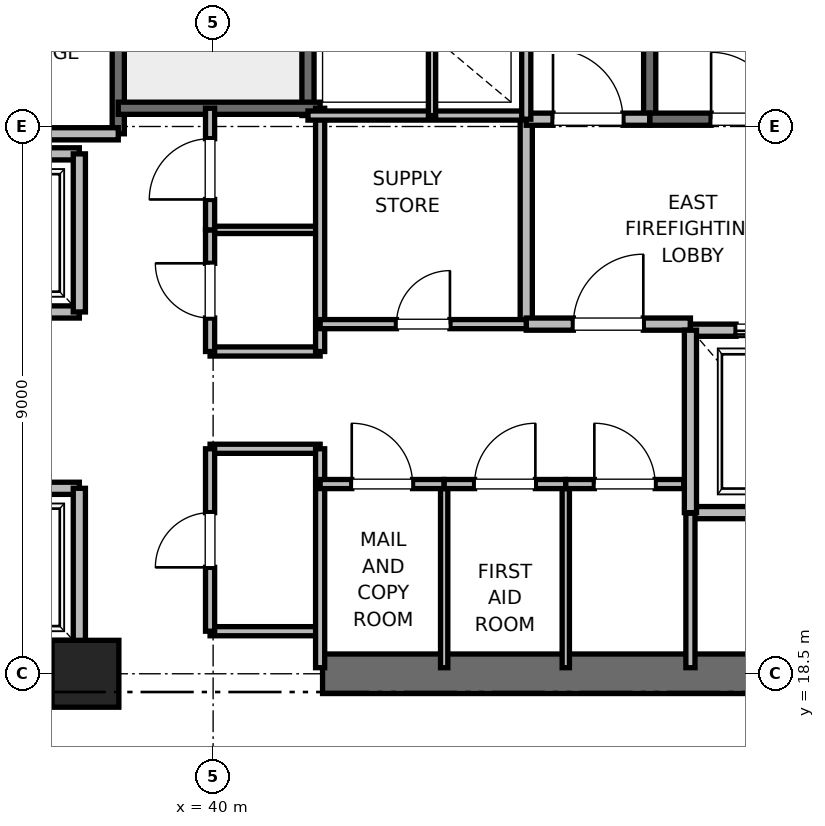
"""IFC4 building model, lengths in metres.
Left out: names, types, materials, properties, quantities, classifications, styles, units other than length and angle.
Written with IfcOpenShell. Run it as: python <this file> out.ifc"""

import sys

from ifc_helpers import new_model, si_unit, direction, frame, frame_2d, origin, origin_2d, place, context, subcontext, project, spatial, rectangle, extrude, element, fill, save


model = new_model("IFC4")
c1 = context("Model", 3, precision=1e-05, world=origin(), true_north=direction((0.0, 1.0)))
c2 = subcontext(c1, "Body", "Model", "MODEL_VIEW")
j1 = project(units=[si_unit("LENGTHUNIT", "METRE"), si_unit("PLANEANGLEUNIT", "RADIAN")], contexts=[c1])
p1 = place(None, origin())
s1 = spatial("IfcSite", under=j1, at=p1, CompositionType="ELEMENT")
p2 = place(p1, origin())
s2 = spatial("IfcBuilding", under=s1, at=p2, CompositionType="ELEMENT")
p3 = place(p2, frame((0.0, 0.0, 63.6)))
s3 = spatial("IfcBuildingStorey", under=s2, at=p3, CompositionType="ELEMENT", Elevation=63.6)
p4 = place(p3, frame((37.9, 18.5, 0.0), z_axis=(0.0, 0.0, 1.0), x_axis=(1.0, 0.0, 0.0)))
e1 = element("IfcColumn", 1, at=p4, inside=s3, PredefinedType="PILASTER", context=c2, shape_type="SweptSolid", body=[
    extrude(rectangle(XDim=1.1, YDim=1.1, at=origin_2d()), origin(), (0.0, 0.0, 1.0), 4.0),
])
for number, where, z_axis, x_axis in (
    (2, (29.0, 18.5, 0.0), (0.0, 0.0, 1.0), (1.0, 0.0, 0.0)),
    (3, (41.8, 18.5, 0.0), (0.0, 0.0, 1.0), (1.0, 0.0, 0.0)),
):
    element("IfcWall", number, at=place(p3, frame(where, z_axis=z_axis, x_axis=x_axis)), inside=s3, PredefinedType="SHEAR", context=c2, shape_type="SweptSolid", body=[
        extrude(rectangle(XDim=9.2, YDim=0.65, at=frame_2d((4.6, 0.0))), origin(), (0.0, 0.0, 1.0), 3.76),
    ])
p5 = place(p3, frame((47.18, 27.62, 0.0), z_axis=(0.0, 0.0, 1.0), x_axis=(0.0, 1.0, 0.0)))
e4 = element("IfcWall", 4, at=p5, inside=s3, PredefinedType="SOLIDWALL", context=c2, shape_type="SweptSolid", body=[
    extrude(rectangle(XDim=8.18, YDim=0.2, at=frame_2d((4.09, 0.0))), origin(), (0.0, 0.0, 1.0), 3.76),
])
p6 = place(p3, frame((47.18, 27.62, 0.0), z_axis=(0.0, 0.0, 1.0), x_axis=(1.0, 0.0, 0.0)))
e5 = element("IfcWall", 5, at=p6, inside=s3, PredefinedType="SOLIDWALL", context=c2, shape_type="SweptSolid", body=[
    extrude(rectangle(XDim=3.12, YDim=0.2, at=frame_2d((1.56, 0.0))), origin(), (0.0, 0.0, 1.0), 3.76),
])
p7 = place(p6, frame((1.01, 0.0, 0.0)))
e6 = element("IfcOpeningElement", 6, at=p7, cuts=e5, PredefinedType="OPENING", context=c2, shape_type="SweptSolid", body=[
    extrude(rectangle(XDim=1.1, YDim=2.15, at=frame_2d((0.55, 1.075))), frame((0.0, 0.1, 0.0), z_axis=(0.0, -1.0, 0.0), x_axis=(1.0, 0.0, 0.0)), (0.0, 0.0, 1.0), 0.2),
])
p8 = place(p3, frame((38.44, 27.38, 0.0), z_axis=(0.0, 0.0, 1.0), x_axis=(0.0, 1.0, 0.0)))
e7 = element("IfcWall", 7, at=p8, inside=s3, PredefinedType="SOLIDWALL", context=c2, shape_type="SweptSolid", body=[
    extrude(rectangle(XDim=8.87, YDim=0.2, at=frame_2d((4.435, 0.0))), origin(), (0.0, 0.0, 1.0), 3.76),
])
p9 = place(p3, frame((41.56, 27.68, 0.0), z_axis=(0.0, 0.0, 1.0), x_axis=(0.0, 1.0, 0.0)))
e8 = element("IfcWall", 8, at=p9, inside=s3, PredefinedType="SOLIDWALL", context=c2, shape_type="SweptSolid", body=[
    extrude(rectangle(XDim=8.57, YDim=0.2, at=frame_2d((4.285, 0.0))), origin(), (0.0, 0.0, 1.0), 3.76),
])
p10 = place(p3, frame((38.44, 27.8, 0.0), z_axis=(0.0, 0.0, 1.0), x_axis=(1.0, 0.0, 0.0)))
e9 = element("IfcWall", 9, at=p10, inside=s3, PredefinedType="SOLIDWALL", context=c2, shape_type="SweptSolid", body=[
    extrude(rectangle(XDim=3.32, YDim=0.2, at=frame_2d((1.66, 0.0))), origin(), (0.0, 0.0, 1.0), 3.76),
])
p11 = place(p3, frame((32.82, 27.38, 0.0), z_axis=(0.0, 0.0, 1.0), x_axis=(1.0, 0.0, 0.0)))
e10 = element("IfcWall", 10, at=p11, inside=s3, PredefinedType="PARTITIONING", context=c2, shape_type="SweptSolid", body=[
    extrude(rectangle(XDim=5.62, YDim=0.2, at=frame_2d((2.81, 0.0))), origin(), (0.0, 0.0, 1.0), 3.76),
])
p12 = place(p3, frame((45.15, 24.25, 0.0), z_axis=(0.0, 0.0, 1.0), x_axis=(0.0, 1.0, 0.0)))
e11 = element("IfcWall", 11, at=p12, inside=s3, PredefinedType="PARTITIONING", context=c2, shape_type="SweptSolid", body=[
    extrude(rectangle(XDim=3.37, YDim=0.2, at=frame_2d((1.685, 0.0))), origin(), (0.0, 0.0, 1.0), 3.76),
])
p13 = place(p3, frame((45.15, 24.25, 0.0), z_axis=(0.0, 0.0, 1.0), x_axis=(1.0, 0.0, 0.0)))
e12 = element("IfcWall", 12, at=p13, inside=s3, PredefinedType="PARTITIONING", context=c2, shape_type="SweptSolid", body=[
    extrude(rectangle(XDim=2.7, YDim=0.2, at=frame_2d((1.35, 0.0))), origin(), (0.0, 0.0, 1.0), 3.76),
])
p14 = place(p13, frame((0.775, 0.0, 0.0)))
e13 = element("IfcOpeningElement", 13, at=p14, cuts=e12, PredefinedType="OPENING", context=c2, shape_type="SweptSolid", body=[
    extrude(rectangle(XDim=1.15, YDim=2.2, at=frame_2d((0.575, 1.1))), frame((0.0, 0.1, 0.0), z_axis=(0.0, -1.0, 0.0), x_axis=(1.0, 0.0, 0.0)), (0.0, 0.0, 1.0), 0.2),
])
p15 = place(p3, frame((45.15, 27.62, 0.0), z_axis=(0.0, 0.0, 1.0), x_axis=(1.0, 0.0, 0.0)))
e14 = element("IfcWall", 14, at=p15, inside=s3, PredefinedType="PARTITIONING", context=c2, shape_type="SweptSolid", body=[
    extrude(rectangle(XDim=2.03, YDim=0.2, at=frame_2d((1.015, 0.0))), origin(), (0.0, 0.0, 1.0), 3.76),
])
p16 = place(p15, frame((0.44, 0.0, 0.0)))
e15 = element("IfcOpeningElement", 15, at=p16, cuts=e14, PredefinedType="OPENING", context=c2, shape_type="SweptSolid", body=[
    extrude(rectangle(XDim=1.15, YDim=2.2, at=frame_2d((0.575, 1.1))), frame((0.0, 0.1, 0.0), z_axis=(0.0, -1.0, 0.0), x_axis=(1.0, 0.0, 0.0)), (0.0, 0.0, 1.0), 0.2),
])
p17 = place(p3, frame((47.85, 21.15, 0.0), z_axis=(0.0, 0.0, 1.0), x_axis=(1.0, 0.0, 0.0)))
e16 = element("IfcWall", 16, at=p17, inside=s3, PredefinedType="SOLIDWALL", context=c2, shape_type="SweptSolid", body=[
    extrude(rectangle(XDim=2.6, YDim=0.2, at=frame_2d((1.3, 0.0))), origin(), (0.0, 0.0, 1.0), 3.76),
])
p18 = place(p3, frame((50.45, 24.15, 0.0), z_axis=(0.0, 0.0, 1.0), x_axis=(-1.0, 0.0, 0.0)))
e17 = element("IfcWall", 17, at=p18, inside=s3, PredefinedType="SOLIDWALL", context=c2, shape_type="SweptSolid", body=[
    extrude(rectangle(XDim=2.6, YDim=0.2, at=frame_2d((1.3, 0.0))), origin(), (0.0, 0.0, 1.0), 2.54),
])
p19 = place(p18, frame((0.75, 0.0, 0.0)))
e18 = element("IfcOpeningElement", 18, at=p19, cuts=e17, PredefinedType="OPENING", context=c2, shape_type="SweptSolid", body=[
    extrude(rectangle(XDim=1.1, YDim=2.2, at=frame_2d((0.55, 1.1))), frame((0.0, 0.1, 0.0), z_axis=(0.0, -1.0, 0.0), x_axis=(1.0, 0.0, 0.0)), (0.0, 0.0, 1.0), 0.2),
])
p20 = place(p3, frame((47.85, 24.15, 0.0), z_axis=(0.0, 0.0, 1.0), x_axis=(0.0, -1.0, 0.0)))
e19 = element("IfcWall", 19, at=p20, inside=s3, PredefinedType="SOLIDWALL", context=c2, shape_type="SweptSolid", body=[
    extrude(rectangle(XDim=3.0, YDim=0.2, at=frame_2d((1.5, 0.0))), origin(), (0.0, 0.0, 1.0), 3.76),
])
p21 = place(p3, frame((35.5, 18.95, 0.0), z_axis=(0.0, 0.0, 1.0), x_axis=(1.0, 0.0, 0.0)))
e20 = element("IfcWall", 20, at=p21, inside=s3, PredefinedType="SOLIDWALL", context=c2, shape_type="SweptSolid", body=[
    extrude(rectangle(XDim=2.3, YDim=0.2, at=frame_2d((1.15, 0.0))), origin(), (0.0, 0.0, 1.0), 2.54),
])
p22 = place(p3, frame((37.8, 21.55, 0.0), z_axis=(0.0, 0.0, 1.0), x_axis=(-1.0, 0.0, 0.0)))
e21 = element("IfcWall", 21, at=p22, inside=s3, PredefinedType="SOLIDWALL", context=c2, shape_type="SweptSolid", body=[
    extrude(rectangle(XDim=2.3, YDim=0.2, at=frame_2d((1.15, 0.0))), origin(), (0.0, 0.0, 1.0), 3.76),
])
p23 = place(p22, frame((0.6, 0.0, 0.0)))
e22 = element("IfcOpeningElement", 22, at=p23, cuts=e21, PredefinedType="OPENING", context=c2, shape_type="SweptSolid", body=[
    extrude(rectangle(XDim=1.1, YDim=2.2, at=frame_2d((0.55, 1.1))), frame((0.0, 0.1, 0.0), z_axis=(0.0, -1.0, 0.0), x_axis=(1.0, 0.0, 0.0)), (0.0, 0.0, 1.0), 0.2),
])
p24 = place(p3, frame((37.8, 18.95, 0.0), z_axis=(0.0, 0.0, 1.0), x_axis=(0.0, 1.0, 0.0)))
e23 = element("IfcWall", 23, at=p24, inside=s3, PredefinedType="SOLIDWALL", context=c2, shape_type="SweptSolid", body=[
    extrude(rectangle(XDim=2.6, YDim=0.2, at=frame_2d((1.3, 0.0))), origin(), (0.0, 0.0, 1.0), 2.54),
])
p25 = place(p3, frame((35.5, 24.45, 0.0), z_axis=(0.0, 0.0, 1.0), x_axis=(1.0, 0.0, 0.0)))
e24 = element("IfcWall", 24, at=p25, inside=s3, PredefinedType="SOLIDWALL", context=c2, shape_type="SweptSolid", body=[
    extrude(rectangle(XDim=2.3, YDim=0.2, at=frame_2d((1.15, 0.0))), origin(), (0.0, 0.0, 1.0), 3.76),
])
p26 = place(p25, frame((0.6, 0.0, 0.0)))
e25 = element("IfcOpeningElement", 25, at=p26, cuts=e24, PredefinedType="OPENING", context=c2, shape_type="SweptSolid", body=[
    extrude(rectangle(XDim=1.1, YDim=2.2, at=frame_2d((0.55, 1.1))), frame((0.0, 0.1, 0.0), z_axis=(0.0, -1.0, 0.0), x_axis=(1.0, 0.0, 0.0)), (0.0, 0.0, 1.0), 0.2),
])
p27 = place(p3, frame((37.8, 27.05, 0.0), z_axis=(0.0, 0.0, 1.0), x_axis=(-1.0, 0.0, 0.0)))
e26 = element("IfcWall", 26, at=p27, inside=s3, PredefinedType="SOLIDWALL", context=c2, shape_type="SweptSolid", body=[
    extrude(rectangle(XDim=2.3, YDim=0.2, at=frame_2d((1.15, 0.0))), origin(), (0.0, 0.0, 1.0), 3.76),
])
p28 = place(p3, frame((37.8, 24.45, 0.0), z_axis=(0.0, 0.0, 1.0), x_axis=(0.0, 1.0, 0.0)))
e27 = element("IfcWall", 27, at=p28, inside=s3, PredefinedType="SOLIDWALL", context=c2, shape_type="SweptSolid", body=[
    extrude(rectangle(XDim=2.6, YDim=0.2, at=frame_2d((1.3, 0.0))), origin(), (0.0, 0.0, 1.0), 3.76),
])
for number, where, z_axis, x_axis in (
    (28, (39.95, 19.2, 0.0), (0.0, 0.0, 1.0), (1.0, 0.0, 0.0)),
    (29, (39.95, 22.2, 0.0), (0.0, 0.0, 1.0), (1.0, 0.0, 0.0)),
    (30, (39.95, 23.8, 0.0), (0.0, 0.0, 1.0), (1.0, 0.0, 0.0)),
):
    element("IfcWall", number, at=place(p3, frame(where, z_axis=z_axis, x_axis=x_axis)), inside=s3, PredefinedType="PARTITIONING", context=c2, shape_type="SweptSolid", body=[
        extrude(rectangle(XDim=1.81, YDim=0.15, at=frame_2d((0.905, 0.0))), origin(), (0.0, 0.0, 1.0), 2.85),
    ])
p29 = place(p3, frame((39.95, 25.8, 0.0), z_axis=(0.0, 0.0, 1.0), x_axis=(1.0, 0.0, 0.0)))
e31 = element("IfcWall", 31, at=p29, inside=s3, PredefinedType="PARTITIONING", context=c2, shape_type="SweptSolid", body=[
    extrude(rectangle(XDim=1.81, YDim=0.12, at=frame_2d((0.905, 0.0))), origin(), (0.0, 0.0, 1.0), 2.85),
])
p30 = place(p3, frame((41.76, 18.6, 0.0), z_axis=(0.0, 0.0, 1.0), x_axis=(0.0, 1.0, 0.0)))
e32 = element("IfcWall", 32, at=p30, inside=s3, PredefinedType="PARTITIONING", context=c2, shape_type="SweptSolid", body=[
    extrude(rectangle(XDim=3.6, YDim=0.15, at=frame_2d((1.8, 0.0))), origin(), (0.0, 0.0, 1.0), 2.54),
])
p31 = place(p3, frame((41.76, 23.8, 0.0), z_axis=(0.0, 0.0, 1.0), x_axis=(0.0, 1.0, 0.0)))
e33 = element("IfcWall", 33, at=p31, inside=s3, PredefinedType="PARTITIONING", context=c2, shape_type="SweptSolid", body=[
    extrude(rectangle(XDim=4.0, YDim=0.15, at=frame_2d((2.0, 0.0))), origin(), (0.0, 0.0, 1.0), 2.85),
])
p32 = place(p3, frame((39.95, 19.2, 0.0), z_axis=(0.0, 0.0, 1.0), x_axis=(0.0, 1.0, 0.0)))
e34 = element("IfcWall", 34, at=p32, inside=s3, PredefinedType="PARTITIONING", context=c2, shape_type="SweptSolid", body=[
    extrude(rectangle(XDim=3.0, YDim=0.15, at=frame_2d((1.5, 0.0))), origin(), (0.0, 0.0, 1.0), 2.85),
])
p33 = place(p32, frame((1.05, 0.0, 0.0)))
e35 = element("IfcOpeningElement", 35, at=p33, cuts=e34, PredefinedType="OPENING", context=c2, shape_type="SweptSolid", body=[
    extrude(rectangle(XDim=0.9, YDim=2.1, at=frame_2d((0.45, 1.05))), frame((0.0, 0.075, 0.0), z_axis=(0.0, -1.0, 0.0), x_axis=(1.0, 0.0, 0.0)), (0.0, 0.0, 1.0), 0.15),
])
p34 = place(p3, frame((39.95, 23.8, 0.0), z_axis=(0.0, 0.0, 1.0), x_axis=(0.0, 1.0, 0.0)))
e36 = element("IfcWall", 36, at=p34, inside=s3, PredefinedType="PARTITIONING", context=c2, shape_type="SweptSolid", body=[
    extrude(rectangle(XDim=2.0, YDim=0.15, at=frame_2d((1.0, 0.0))), origin(), (0.0, 0.0, 1.0), 2.85),
])
p35 = place(p34, frame((0.55, 0.0, 0.0)))
e37 = element("IfcOpeningElement", 37, at=p35, cuts=e36, PredefinedType="OPENING", context=c2, shape_type="SweptSolid", body=[
    extrude(rectangle(XDim=0.9, YDim=2.1, at=frame_2d((0.45, 1.05))), frame((0.0, 0.075, 0.0), z_axis=(0.0, -1.0, 0.0), x_axis=(1.0, 0.0, 0.0)), (0.0, 0.0, 1.0), 0.15),
])
p36 = place(p3, frame((39.95, 25.8, 0.0), z_axis=(0.0, 0.0, 1.0), x_axis=(0.0, 1.0, 0.0)))
e38 = element("IfcWall", 38, at=p36, inside=s3, PredefinedType="PARTITIONING", context=c2, shape_type="SweptSolid", body=[
    extrude(rectangle(XDim=2.0, YDim=0.15, at=frame_2d((1.0, 0.0))), origin(), (0.0, 0.0, 1.0), 2.85),
])
p37 = place(p36, frame((0.5, 0.0, 0.0)))
e39 = element("IfcOpeningElement", 39, at=p37, cuts=e38, PredefinedType="OPENING", context=c2, shape_type="SweptSolid", body=[
    extrude(rectangle(XDim=1.0, YDim=2.15, at=frame_2d((0.5, 1.075))), frame((0.0, 0.075, 0.0), z_axis=(0.0, -1.0, 0.0), x_axis=(1.0, 0.0, 0.0)), (0.0, 0.0, 1.0), 0.15),
])
p38 = place(p3, frame((41.56, 27.68, 0.0), z_axis=(0.0, 0.0, 1.0), x_axis=(1.0, 0.0, 0.0)))
e40 = element("IfcWall", 40, at=p38, inside=s3, PredefinedType="PARTITIONING", context=c2, shape_type="SweptSolid", body=[
    extrude(rectangle(XDim=3.59, YDim=0.15, at=frame_2d((1.795, 0.0))), origin(), (0.0, 0.0, 1.0), 2.85),
])
p39 = place(p3, frame((47.85, 18.6, 0.0), z_axis=(0.0, 0.0, 1.0), x_axis=(0.0, 1.0, 0.0)))
e41 = element("IfcWall", 41, at=p39, inside=s3, PredefinedType="PARTITIONING", context=c2, shape_type="SweptSolid", body=[
    extrude(rectangle(XDim=2.54, YDim=0.15, at=frame_2d((1.27, 0.0))), origin(), (0.0, 0.0, 1.0), 2.85),
])
for number, where, z_axis, x_axis in (
    (42, (43.8, 18.6, 0.0), (0.0, 0.0, 1.0), (0.0, 1.0, 0.0)),
    (43, (45.8, 18.6, 0.0), (0.0, 0.0, 1.0), (0.0, 1.0, 0.0)),
):
    element("IfcWall", number, at=place(p3, frame(where, z_axis=z_axis, x_axis=x_axis)), inside=s3, PredefinedType="PARTITIONING", context=c2, shape_type="SweptSolid", body=[
        extrude(rectangle(XDim=3.02, YDim=0.12, at=frame_2d((1.51, 0.0))), origin(), (0.0, 0.0, 1.0), 2.85),
    ])
p40 = place(p3, frame((41.76, 21.62, 0.0), z_axis=(0.0, 0.0, 1.0), x_axis=(1.0, 0.0, 0.0)))
e44 = element("IfcWall", 44, at=p40, inside=s3, PredefinedType="PARTITIONING", context=c2, shape_type="SweptSolid", body=[
    extrude(rectangle(XDim=2.04, YDim=0.15, at=frame_2d((1.02, 0.0))), origin(), (0.0, 0.0, 1.0), 2.85),
])
p41 = place(p40, frame((0.52, 0.0, 0.0)))
e45 = element("IfcOpeningElement", 45, at=p41, cuts=e44, PredefinedType="OPENING", context=c2, shape_type="SweptSolid", body=[
    extrude(rectangle(XDim=1.0, YDim=2.15, at=frame_2d((0.5, 1.075))), frame((0.0, 0.075, 0.0), z_axis=(0.0, -1.0, 0.0), x_axis=(1.0, 0.0, 0.0)), (0.0, 0.0, 1.0), 0.15),
])
p42 = place(p3, frame((43.8, 21.62, 0.0), z_axis=(0.0, 0.0, 1.0), x_axis=(1.0, 0.0, 0.0)))
e46 = element("IfcWall", 46, at=p42, inside=s3, PredefinedType="PARTITIONING", context=c2, shape_type="SweptSolid", body=[
    extrude(rectangle(XDim=2.0, YDim=0.15, at=frame_2d((1.0, 0.0))), origin(), (0.0, 0.0, 1.0), 2.85),
])
p43 = place(p42, frame((0.5, 0.0, 0.0)))
e47 = element("IfcOpeningElement", 47, at=p43, cuts=e46, PredefinedType="OPENING", context=c2, shape_type="SweptSolid", body=[
    extrude(rectangle(XDim=1.0, YDim=2.15, at=frame_2d((0.5, 1.075))), frame((0.0, 0.075, 0.0), z_axis=(0.0, -1.0, 0.0), x_axis=(1.0, 0.0, 0.0)), (0.0, 0.0, 1.0), 0.15),
])
p44 = place(p3, frame((45.8, 21.62, 0.0), z_axis=(0.0, 0.0, 1.0), x_axis=(1.0, 0.0, 0.0)))
e48 = element("IfcWall", 48, at=p44, inside=s3, PredefinedType="PARTITIONING", context=c2, shape_type="SweptSolid", body=[
    extrude(rectangle(XDim=1.94, YDim=0.15, at=frame_2d((0.97, 0.0))), origin(), (0.0, 0.0, 1.0), 2.85),
])
p45 = place(p44, frame((0.47, 0.0, 0.0)))
e49 = element("IfcOpeningElement", 49, at=p45, cuts=e48, PredefinedType="OPENING", context=c2, shape_type="SweptSolid", body=[
    extrude(rectangle(XDim=1.0, YDim=2.15, at=frame_2d((0.5, 1.075))), frame((0.0, 0.075, 0.0), z_axis=(0.0, -1.0, 0.0), x_axis=(1.0, 0.0, 0.0)), (0.0, 0.0, 1.0), 0.15),
])
p46 = place(p3, frame((41.76, 24.25, 0.0), z_axis=(0.0, 0.0, 1.0), x_axis=(1.0, 0.0, 0.0)))
e50 = element("IfcWall", 50, at=p46, inside=s3, PredefinedType="PARTITIONING", context=c2, shape_type="SweptSolid", body=[
    extrude(rectangle(XDim=3.39, YDim=0.15, at=frame_2d((1.695, 0.0))), origin(), (0.0, 0.0, 1.0), 2.85),
])
p47 = place(p46, frame((1.255, 0.0, 0.0)))
e51 = element("IfcOpeningElement", 51, at=p47, cuts=e50, PredefinedType="OPENING", context=c2, shape_type="SweptSolid", body=[
    extrude(rectangle(XDim=0.88, YDim=2.1, at=frame_2d((0.44, 1.05))), frame((0.0, 0.075, 0.0), z_axis=(0.0, -1.0, 0.0), x_axis=(1.0, 0.0, 0.0)), (0.0, 0.0, 1.0), 0.15),
])
p48 = place(p3, frame((45.15, 27.62, 0.0), z_axis=(0.0, 0.0, 1.0), x_axis=(0.0, 1.0, 0.0)))
e52 = element("IfcWall", 52, at=p48, inside=s3, PredefinedType="PARTITIONING", context=c2, shape_type="SweptSolid", body=[
    extrude(rectangle(XDim=3.1, YDim=0.15, at=frame_2d((1.55, 0.0))), origin(), (0.0, 0.0, 1.0), 2.85),
])
p49 = place(p3, frame((43.6, 27.68, 0.0), z_axis=(0.0, 0.0, 1.0), x_axis=(0.0, 1.0, 0.0)))
e53 = element("IfcWall", 53, at=p49, inside=s3, PredefinedType="PARTITIONING", context=c2, shape_type="SweptSolid", body=[
    extrude(rectangle(XDim=3.04, YDim=0.12, at=frame_2d((1.52, 0.0))), origin(), (0.0, 0.0, 1.0), 2.85),
])
p50 = place(p7, origin())
e54 = element("IfcDoor", 54, at=p50, inside=s3, OperationType="SINGLE_SWING_LEFT", PredefinedType="DOOR", context=c2, shape_type="SweptSolid", body=[
    extrude(rectangle(XDim=1.1, YDim=2.15, at=frame_2d((0.55, 1.075))), frame((0.0, 0.025, 0.0), z_axis=(0.0, -1.0, 0.0), x_axis=(1.0, 0.0, 0.0)), (0.0, 0.0, 1.0), 0.05),
])
fill(e6, e54)
p51 = place(p14, origin())
e55 = element("IfcDoor", 55, at=p51, inside=s3, OperationType="SINGLE_SWING_RIGHT", PredefinedType="DOOR", context=c2, shape_type="SweptSolid", body=[
    extrude(rectangle(XDim=1.15, YDim=2.2, at=frame_2d((0.575, 1.1))), frame((0.0, 0.025, 0.0), z_axis=(0.0, -1.0, 0.0), x_axis=(1.0, 0.0, 0.0)), (0.0, 0.0, 1.0), 0.05),
])
fill(e13, e55)
p52 = place(p16, origin())
e56 = element("IfcDoor", 56, at=p52, inside=s3, OperationType="SINGLE_SWING_LEFT", PredefinedType="DOOR", context=c2, shape_type="SweptSolid", body=[
    extrude(rectangle(XDim=1.15, YDim=2.2, at=frame_2d((0.575, 1.1))), frame((0.0, 0.025, 0.0), z_axis=(0.0, -1.0, 0.0), x_axis=(1.0, 0.0, 0.0)), (0.0, 0.0, 1.0), 0.05),
])
fill(e15, e56)
p53 = place(p19, origin())
e57 = element("IfcDoor", 57, at=p53, inside=s3, OperationType="SLIDING_TO_RIGHT", PredefinedType="DOOR", context=c2, shape_type="SweptSolid", body=[
    extrude(rectangle(XDim=1.1, YDim=2.2, at=frame_2d((0.55, 1.1))), frame((0.0, 0.025, 0.0), z_axis=(0.0, -1.0, 0.0), x_axis=(1.0, 0.0, 0.0)), (0.0, 0.0, 1.0), 0.05),
])
fill(e18, e57)
p54 = place(p33, origin())
e58 = element("IfcDoor", 58, at=p54, inside=s3, OperationType="SINGLE_SWING_LEFT", PredefinedType="DOOR", context=c2, shape_type="SweptSolid", body=[
    extrude(rectangle(XDim=0.9, YDim=2.1, at=frame_2d((0.45, 1.05))), frame((0.0, 0.025, 0.0), z_axis=(0.0, -1.0, 0.0), x_axis=(1.0, 0.0, 0.0)), (0.0, 0.0, 1.0), 0.05),
])
fill(e35, e58)
p55 = place(p35, origin())
e59 = element("IfcDoor", 59, at=p55, inside=s3, OperationType="SINGLE_SWING_RIGHT", PredefinedType="DOOR", context=c2, shape_type="SweptSolid", body=[
    extrude(rectangle(XDim=0.9, YDim=2.1, at=frame_2d((0.45, 1.05))), frame((0.0, 0.025, 0.0), z_axis=(0.0, -1.0, 0.0), x_axis=(1.0, 0.0, 0.0)), (0.0, 0.0, 1.0), 0.05),
])
fill(e37, e59)
p56 = place(p37, origin())
e60 = element("IfcDoor", 60, at=p56, inside=s3, OperationType="SINGLE_SWING_LEFT", PredefinedType="DOOR", context=c2, shape_type="SweptSolid", body=[
    extrude(rectangle(XDim=1.0, YDim=2.15, at=frame_2d((0.5, 1.075))), frame((0.0, 0.025, 0.0), z_axis=(0.0, -1.0, 0.0), x_axis=(1.0, 0.0, 0.0)), (0.0, 0.0, 1.0), 0.05),
])
fill(e39, e60)
p57 = place(p41, origin())
e61 = element("IfcDoor", 61, at=p57, inside=s3, OperationType="SINGLE_SWING_LEFT", PredefinedType="DOOR", context=c2, shape_type="SweptSolid", body=[
    extrude(rectangle(XDim=1.0, YDim=2.15, at=frame_2d((0.5, 1.075))), frame((0.0, 0.025, 0.0), z_axis=(0.0, -1.0, 0.0), x_axis=(1.0, 0.0, 0.0)), (0.0, 0.0, 1.0), 0.05),
])
fill(e45, e61)
p58 = place(p43, origin())
e62 = element("IfcDoor", 62, at=p58, inside=s3, OperationType="SINGLE_SWING_RIGHT", PredefinedType="DOOR", context=c2, shape_type="SweptSolid", body=[
    extrude(rectangle(XDim=1.0, YDim=2.15, at=frame_2d((0.5, 1.075))), frame((0.0, 0.025, 0.0), z_axis=(0.0, -1.0, 0.0), x_axis=(1.0, 0.0, 0.0)), (0.0, 0.0, 1.0), 0.05),
])
fill(e47, e62)
p59 = place(p45, origin())
e63 = element("IfcDoor", 63, at=p59, inside=s3, OperationType="SINGLE_SWING_LEFT", PredefinedType="DOOR", context=c2, shape_type="SweptSolid", body=[
    extrude(rectangle(XDim=1.0, YDim=2.15, at=frame_2d((0.5, 1.075))), frame((0.0, 0.025, 0.0), z_axis=(0.0, -1.0, 0.0), x_axis=(1.0, 0.0, 0.0)), (0.0, 0.0, 1.0), 0.05),
])
fill(e49, e63)
p60 = place(p47, origin())
e64 = element("IfcDoor", 64, at=p60, inside=s3, OperationType="SINGLE_SWING_RIGHT", PredefinedType="DOOR", context=c2, shape_type="SweptSolid", body=[
    extrude(rectangle(XDim=0.88, YDim=2.1, at=frame_2d((0.44, 1.05))), frame((0.0, 0.025, 0.0), z_axis=(0.0, -1.0, 0.0), x_axis=(1.0, 0.0, 0.0)), (0.0, 0.0, 1.0), 0.05),
])
fill(e51, e64)
save(model, sys.argv[1])
